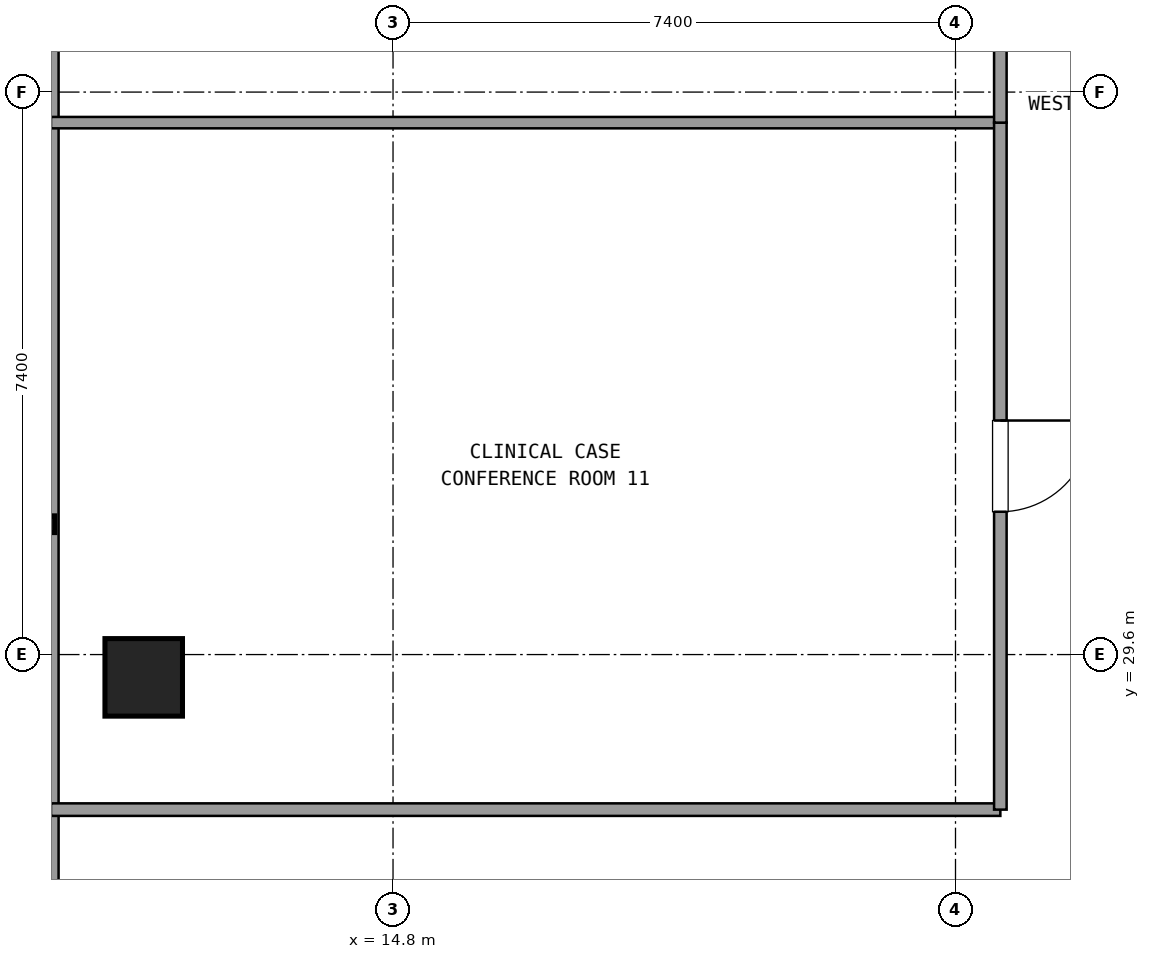
"""IFC4 building model, lengths in metres.
Left out: names, types, materials, properties, quantities, classifications, styles, units other than length and angle.
Written with IfcOpenShell. Run it as: python <this file> out.ifc"""

import sys

from ifc_helpers import new_model, si_unit, direction, frame, frame_2d, origin, origin_2d, place, context, subcontext, project, spatial, rectangle, extrude, element, fill, save


model = new_model("IFC4")
c1 = context("Model", 3, precision=1e-05, world=origin(), true_north=direction((0.0, 1.0)))
c2 = subcontext(c1, "Body", "Model", "MODEL_VIEW")
j1 = project(units=[si_unit("LENGTHUNIT", "METRE"), si_unit("PLANEANGLEUNIT", "RADIAN")], contexts=[c1])
p1 = place(None, origin())
s1 = spatial("IfcSite", under=j1, at=p1, CompositionType="ELEMENT")
p2 = place(p1, origin())
s2 = spatial("IfcBuilding", under=s1, at=p2, CompositionType="ELEMENT")
p3 = place(p2, frame((0.0, 0.0, 81.18)))
s3 = spatial("IfcBuildingStorey", under=s2, at=p3, CompositionType="ELEMENT", Elevation=81.18)
p4 = place(p3, frame((11.52, 29.3, 0.0), z_axis=(0.0, 0.0, 1.0), x_axis=(1.0, 0.0, 0.0)))
e1 = element("IfcColumn", 1, at=p4, inside=s3, PredefinedType="COLUMN", context=c2, shape_type="SweptSolid", body=[
    extrude(rectangle(XDim=1.02, YDim=1.02, at=origin_2d()), origin(), (0.0, 0.0, 1.0), 3.6),
])
p5 = place(p3, frame((10.28, 42.145, 0.0), z_axis=(0.0, 0.0, 1.0), x_axis=(0.0, -1.0, 0.0)))
e2 = element("IfcWall", 2, at=p5, inside=s3, PredefinedType="SOLIDWALL", context=c2, shape_type="SweptSolid", body=[
    extrude(rectangle(XDim=32.49, YDim=0.24, at=frame_2d((16.245, 0.0))), origin(), (0.0, 0.0, 1.0), 0.85),
])
p6 = place(p3, frame((10.3, 27.56, 0.0), z_axis=(0.0, 0.0, 1.0), x_axis=(1.0, 0.0, 0.0)))
e3 = element("IfcWall", 3, at=p6, inside=s3, PredefinedType="PARTITIONING", context=c2, shape_type="SweptSolid", body=[
    extrude(rectangle(XDim=12.49, YDim=0.165, at=frame_2d((6.245, 0.0))), origin(), (0.0, 0.0, 1.0), 2.61),
])
p7 = place(p3, frame((22.79, 36.598, 0.0), z_axis=(0.0, 0.0, 1.0), x_axis=(-1.0, 0.0, 0.0)))
e4 = element("IfcWall", 4, at=p7, inside=s3, PredefinedType="PARTITIONING", context=c2, shape_type="SweptSolid", body=[
    extrude(rectangle(XDim=12.49, YDim=0.15, at=frame_2d((6.245, 0.0))), origin(), (0.0, 0.0, 1.0), 2.61),
])
p8 = place(p3, frame((22.79, 27.56, 0.0), z_axis=(0.0, 0.0, 1.0), x_axis=(0.0, 1.0, 0.0)))
e5 = element("IfcWall", 5, at=p8, inside=s3, PredefinedType="PARTITIONING", context=c2, shape_type="SweptSolid", body=[
    extrude(rectangle(XDim=9.038, YDim=0.165, at=frame_2d((4.519, 0.0))), origin(), (0.0, 0.0, 1.0), 2.61),
])
p9 = place(p8, frame((3.919, 0.0, 0.0)))
e6 = element("IfcOpeningElement", 6, at=p9, cuts=e5, PredefinedType="OPENING", context=c2, shape_type="SweptSolid", body=[
    extrude(rectangle(XDim=1.2, YDim=2.15, at=frame_2d((0.6, 1.075))), frame((0.0, 0.093, 0.0), z_axis=(0.0, -1.0, 0.0), x_axis=(1.0, 0.0, 0.0)), (0.0, 0.0, 1.0), 0.185),
])
p10 = place(p3, frame((22.79, 36.598, 0.0), z_axis=(0.0, 0.0, 1.0), x_axis=(0.0, 1.0, 0.0)))
e7 = element("IfcWall", 7, at=p10, inside=s3, PredefinedType="PARTITIONING", context=c2, shape_type="SweptSolid", body=[
    extrude(rectangle(XDim=11.502, YDim=0.165, at=frame_2d((5.751, 0.0))), origin(), (0.0, 0.0, 1.0), 2.61),
])
p11 = place(p10, frame((5.151, 0.0, 0.0)))
e8 = element("IfcOpeningElement", 8, at=p11, cuts=e7, PredefinedType="OPENING", context=c2, shape_type="SweptSolid", body=[
    extrude(rectangle(XDim=1.2, YDim=2.15, at=frame_2d((0.6, 1.075))), frame((0.0, 0.093, 0.0), z_axis=(0.0, -1.0, 0.0), x_axis=(1.0, 0.0, 0.0)), (0.0, 0.0, 1.0), 0.185),
])
p12 = place(p9, frame((1.2, 0.0, 0.0), z_axis=(0.0, 0.0, 1.0), x_axis=(-1.0, 0.0, 0.0)))
e9 = element("IfcDoor", 9, at=p12, inside=s3, OperationType="SINGLE_SWING_RIGHT", PredefinedType="DOOR", context=c2, shape_type="SweptSolid", body=[
    extrude(rectangle(XDim=1.2, YDim=2.15, at=frame_2d((0.6, 1.075))), frame((0.0, 0.025, 0.0), z_axis=(0.0, -1.0, 0.0), x_axis=(1.0, 0.0, 0.0)), (0.0, 0.0, 1.0), 0.05),
])
fill(e6, e9)
save(model, sys.argv[1])
